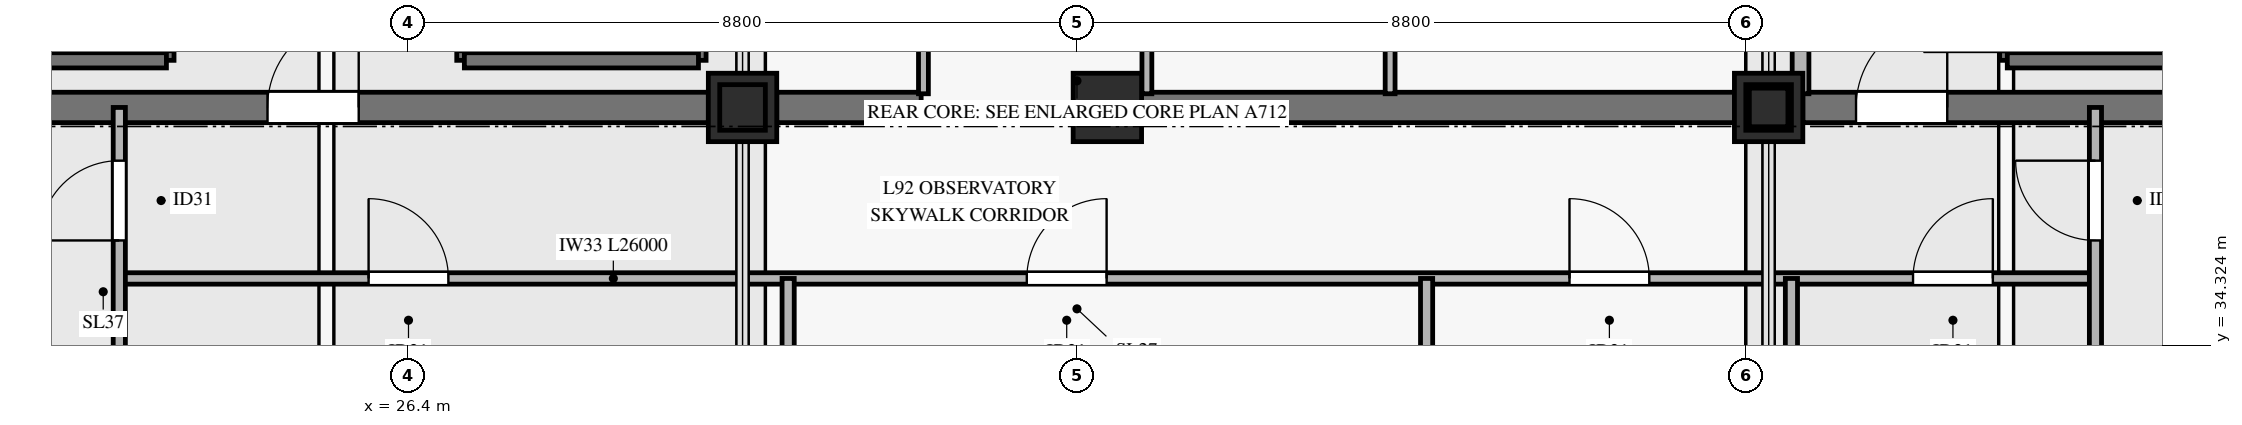
"""IFC4 building model, lengths in metres.
Left out: names, types, materials, properties, quantities, classifications, styles, units other than length and angle.
Written with IfcOpenShell. Run it as: python <this file> out.ifc"""

import sys

from ifc_helpers import new_model, si_unit, direction, frame, frame_2d, origin, origin_2d, place, context, subcontext, project, spatial, rectangle, hollow_rectangle, hollow_circle, extrude, source, transform, mapped, element, fill, save


model = new_model("IFC4")
c1 = context("Model", 3, precision=1e-05, world=origin(), true_north=direction((0.0, 1.0)))
c2 = subcontext(c1, "Body", "Model", "MODEL_VIEW")
j1 = project(units=[si_unit("LENGTHUNIT", "METRE"), si_unit("PLANEANGLEUNIT", "RADIAN")], contexts=[c1])
p1 = place(None, origin())
s1 = spatial("IfcSite", under=j1, at=p1, CompositionType="ELEMENT")
p2 = place(p1, origin())
s2 = spatial("IfcBuilding", under=s1, at=p2, CompositionType="ELEMENT")
p3 = place(p2, frame((0.0, 0.0, 352.7)))
s3 = spatial("IfcBuildingStorey", under=s2, at=p3, CompositionType="ELEMENT", Elevation=352.7)
m1 = source(origin(), c2, "Body", "SweptSolid", [
    extrude(rectangle(XDim=0.9, YDim=0.9, at=origin_2d()), origin(), (0.0, 0.0, 1.0), 6.16),
])
for number, where, z_axis, x_axis in (
    (1, (30.8, 37.45, 0.0), (0.0, 0.0, 1.0), (1.0, 0.0, 0.0)),
    (2, (35.6, 37.45, 0.0), (0.0, 0.0, 1.0), (1.0, 0.0, 0.0)),
    (3, (44.3, 37.45, 0.0), (0.0, 0.0, 1.0), (1.0, 0.0, 0.0)),
):
    element("IfcColumn", number, at=place(p3, frame(where, z_axis=z_axis, x_axis=x_axis)), inside=s3, PredefinedType="PILASTER", context=c2, shape_type="MappedRepresentation", body=[
        mapped(m1, transform((0.0, 0.0, 0.0), x_axis=(1.0, 0.0, 0.0), y_axis=(0.0, 1.0, 0.0), z_axis=(0.0, 0.0, 1.0), scale=1.0)),
    ])
p4 = place(p3, frame((20.3, 37.45, 0.0), z_axis=(0.0, 0.0, 1.0), x_axis=(1.0, 0.0, 0.0)))
e4 = element("IfcWall", 4, at=p4, inside=s3, PredefinedType="SHEAR", context=c2, shape_type="SweptSolid", body=[
    extrude(rectangle(XDim=10.05, YDim=0.4, at=frame_2d((5.025, 0.0))), origin(), (0.0, 0.0, 1.0), 6.16),
])
p5 = place(p4, frame((4.25, 0.0, 0.0)))
e5 = element("IfcOpeningElement", 5, at=p5, cuts=e4, PredefinedType="OPENING", context=c2, shape_type="SweptSolid", body=[
    extrude(rectangle(XDim=1.2, YDim=2.15, at=frame_2d((0.6, 1.075))), frame((0.0, 0.21, 0.0), z_axis=(0.0, -1.0, 0.0), x_axis=(1.0, 0.0, 0.0)), (0.0, 0.0, 1.0), 0.42),
])
p6 = place(p3, frame((31.25, 37.45, 0.0), z_axis=(0.0, 0.0, 1.0), x_axis=(1.0, 0.0, 0.0)))
e6 = element("IfcWall", 6, at=p6, inside=s3, PredefinedType="SHEAR", context=c2, shape_type="SweptSolid", body=[
    extrude(rectangle(XDim=1.9, YDim=0.4, at=frame_2d((0.95, 0.0))), origin(), (0.0, 0.0, 1.0), 6.16),
])
p7 = place(p3, frame((36.05, 37.45, 0.0), z_axis=(0.0, 0.0, 1.0), x_axis=(1.0, 0.0, 0.0)))
e7 = element("IfcWall", 7, at=p7, inside=s3, PredefinedType="SHEAR", context=c2, shape_type="SweptSolid", body=[
    extrude(rectangle(XDim=7.8, YDim=0.4, at=frame_2d((3.9, 0.0))), origin(), (0.0, 0.0, 1.0), 6.16),
])
p8 = place(p3, frame((44.75, 37.45, 0.0), z_axis=(0.0, 0.0, 1.0), x_axis=(1.0, 0.0, 0.0)))
e8 = element("IfcWall", 8, at=p8, inside=s3, PredefinedType="SHEAR", context=c2, shape_type="SweptSolid", body=[
    extrude(rectangle(XDim=5.35, YDim=0.4, at=frame_2d((2.675, 0.0))), origin(), (0.0, 0.0, 1.0), 6.16),
])
p9 = place(p8, frame((0.7, 0.0, 0.0)))
e9 = element("IfcOpeningElement", 9, at=p9, cuts=e8, PredefinedType="OPENING", context=c2, shape_type="SweptSolid", body=[
    extrude(rectangle(XDim=1.2, YDim=2.15, at=frame_2d((0.6, 1.075))), frame((0.0, 0.21, 0.0), z_axis=(0.0, -1.0, 0.0), x_axis=(1.0, 0.0, 0.0)), (0.0, 0.0, 1.0), 0.42),
])
m2 = source(origin(), c2, "Body", "SweptSolid", [
    extrude(hollow_rectangle(XDim=0.6, YDim=0.6, WallThickness=0.028, at=origin_2d()), origin(), (0.0, 0.0, 1.0), 21.147),
])
p10 = place(p3, frame((30.8, 37.45, 6.4), z_axis=(0.0, 0.0, 1.0), x_axis=(1.0, 0.0, 0.0)))
e10 = element("IfcColumn", 10, at=p10, inside=s3, PredefinedType="COLUMN", context=c2, shape_type="MappedRepresentation", body=[
    mapped(m2, transform((0.0, 0.0, 0.0), x_axis=(1.0, 0.0, 0.0), y_axis=(0.0, 1.0, 0.0), z_axis=(0.0, 0.0, 1.0), scale=1.0)),
])
m3 = source(origin(), c2, "Body", "SweptSolid", [
    extrude(hollow_rectangle(XDim=0.6, YDim=0.6, WallThickness=0.028, at=origin_2d()), origin(), (0.0, 0.0, 1.0), 32.096),
])
p11 = place(p3, frame((44.3, 37.45, 6.4), z_axis=(0.0, 0.0, 1.0), x_axis=(1.0, 0.0, 0.0)))
e11 = element("IfcColumn", 11, at=p11, inside=s3, PredefinedType="COLUMN", context=c2, shape_type="MappedRepresentation", body=[
    mapped(m3, transform((0.0, 0.0, 0.0), x_axis=(1.0, 0.0, 0.0), y_axis=(0.0, 1.0, 0.0), z_axis=(0.0, 0.0, 1.0), scale=1.0)),
])
m4 = source(origin(), c2, "Body", "SweptSolid", [
    extrude(hollow_circle(Radius=0.254, WallThickness=0.024, at=origin_2d()), origin(), (0.0, 0.0, 1.0), 1.704),
])
p12 = place(p3, frame((44.3, 37.45, 38.496), z_axis=(0.0, 0.0, 1.0), x_axis=(1.0, 0.0, 0.0)))
e12 = element("IfcColumn", 12, at=p12, inside=s3, PredefinedType="COLUMN", context=c2, shape_type="MappedRepresentation", body=[
    mapped(m4, transform((0.0, 0.0, 0.0), x_axis=(1.0, 0.0, 0.0), y_axis=(0.0, 1.0, 0.0), z_axis=(0.0, 0.0, 1.0), scale=1.0)),
])
p13 = place(p3, frame((23.22, 38.07, 0.0), z_axis=(0.0, 0.0, 1.0), x_axis=(0.0, 1.0, 0.0)))
e13 = element("IfcWall", 13, at=p13, inside=s3, PredefinedType="SOLIDWALL", context=c2, shape_type="SweptSolid", body=[
    extrude(rectangle(XDim=7.25, YDim=0.2, at=frame_2d((3.625, 0.0))), origin(), (0.0, 0.0, 1.0), 6.4),
])
p14 = place(p13, frame((0.11, 0.0, 0.0)))
e14 = element("IfcOpeningElement", 14, at=p14, cuts=e13, PredefinedType="OPENING", context=c2, shape_type="SweptSolid", body=[
    extrude(rectangle(XDim=1.1, YDim=2.15, at=frame_2d((0.55, 1.075))), frame((0.0, 0.11, 0.0), z_axis=(0.0, -1.0, 0.0), x_axis=(1.0, 0.0, 0.0)), (0.0, 0.0, 1.0), 0.22),
])
p15 = place(p3, frame((20.17, 38.07, 0.0), z_axis=(0.0, 0.0, 1.0), x_axis=(1.0, 0.0, 0.0)))
e15 = element("IfcWall", 15, at=p15, inside=s3, PredefinedType="SOLIDWALL", context=c2, shape_type="SweptSolid", body=[
    extrude(rectangle(XDim=3.05, YDim=0.2, at=frame_2d((1.525, 0.0))), origin(), (0.0, 0.0, 1.0), 6.4),
])
p16 = place(p3, frame((27.14, 38.07, 0.0), z_axis=(0.0, 0.0, 1.0), x_axis=(0.0, 1.0, 0.0)))
e16 = element("IfcWall", 16, at=p16, inside=s3, PredefinedType="SOLIDWALL", context=c2, shape_type="SweptSolid", body=[
    extrude(rectangle(XDim=7.25, YDim=0.2, at=frame_2d((3.625, 0.0))), origin(), (0.0, 0.0, 1.0), 6.4),
])
p17 = place(p16, frame((0.11, 0.0, 0.0)))
e17 = element("IfcOpeningElement", 17, at=p17, cuts=e16, PredefinedType="OPENING", context=c2, shape_type="SweptSolid", body=[
    extrude(rectangle(XDim=1.1, YDim=2.15, at=frame_2d((0.55, 1.075))), frame((0.0, 0.11, 0.0), z_axis=(0.0, -1.0, 0.0), x_axis=(1.0, 0.0, 0.0)), (0.0, 0.0, 1.0), 0.22),
])
p18 = place(p3, frame((30.22, 38.07, 0.0), z_axis=(0.0, 0.0, 1.0), x_axis=(0.0, 1.0, 0.0)))
e18 = element("IfcWall", 18, at=p18, inside=s3, PredefinedType="SOLIDWALL", context=c2, shape_type="SweptSolid", body=[
    extrude(rectangle(XDim=7.25, YDim=0.2, at=frame_2d((3.625, 0.0))), origin(), (0.0, 0.0, 1.0), 6.4),
])
p19 = place(p3, frame((27.14, 38.07, 0.0), z_axis=(0.0, 0.0, 1.0), x_axis=(1.0, 0.0, 0.0)))
e19 = element("IfcWall", 19, at=p19, inside=s3, PredefinedType="SOLIDWALL", context=c2, shape_type="SweptSolid", body=[
    extrude(rectangle(XDim=3.08, YDim=0.2, at=frame_2d((1.54, 0.0))), origin(), (0.0, 0.0, 1.0), 6.4),
])
p20 = place(p3, frame((47.44, 38.07, 0.0), z_axis=(0.0, 0.0, 1.0), x_axis=(0.0, 1.0, 0.0)))
e20 = element("IfcWall", 20, at=p20, inside=s3, PredefinedType="SOLIDWALL", context=c2, shape_type="SweptSolid", body=[
    extrude(rectangle(XDim=7.25, YDim=0.2, at=frame_2d((3.625, 0.0))), origin(), (0.0, 0.0, 1.0), 6.4),
])
p21 = place(p20, frame((0.11, 0.0, 0.0)))
e21 = element("IfcOpeningElement", 21, at=p21, cuts=e20, PredefinedType="OPENING", context=c2, shape_type="SweptSolid", body=[
    extrude(rectangle(XDim=1.1, YDim=2.15, at=frame_2d((0.55, 1.075))), frame((0.0, 0.11, 0.0), z_axis=(0.0, -1.0, 0.0), x_axis=(1.0, 0.0, 0.0)), (0.0, 0.0, 1.0), 0.22),
])
p22 = place(p3, frame((47.44, 38.07, 0.0), z_axis=(0.0, 0.0, 1.0), x_axis=(1.0, 0.0, 0.0)))
e22 = element("IfcWall", 22, at=p22, inside=s3, PredefinedType="SOLIDWALL", context=c2, shape_type="SweptSolid", body=[
    extrude(rectangle(XDim=2.93, YDim=0.2, at=frame_2d((1.465, 0.0))), origin(), (0.0, 0.0, 1.0), 6.4),
])
p23 = place(p3, frame((44.72, 37.63, 0.0), z_axis=(0.0, 0.0, 1.0), x_axis=(0.0, 1.0, 0.0)))
e23 = element("IfcWall", 23, at=p23, inside=s3, PredefinedType="SOLIDWALL", context=c2, shape_type="SweptSolid", body=[
    extrude(rectangle(XDim=7.59, YDim=0.22, at=frame_2d((3.795, 0.0))), origin(), (0.0, 0.0, 1.0), 6.16),
])
p24 = place(p3, frame((36.12, 37.63, 0.0), z_axis=(0.0, 0.0, 1.0), x_axis=(0.0, 1.0, 0.0)))
e24 = element("IfcWall", 24, at=p24, inside=s3, PredefinedType="PARTITIONING", context=c2, shape_type="SweptSolid", body=[
    extrude(rectangle(XDim=2.29, YDim=0.13, at=frame_2d((1.145, 0.0))), origin(), (0.0, 0.0, 1.0), 6.16),
])
p25 = place(p24, frame((0.69, 0.0, 0.0)))
e25 = element("IfcOpeningElement", 25, at=p25, cuts=e24, PredefinedType="OPENING", context=c2, shape_type="SweptSolid", body=[
    extrude(rectangle(XDim=0.9, YDim=2.1, at=frame_2d((0.45, 1.05))), frame((0.0, 0.075, 0.0), z_axis=(0.0, -1.0, 0.0), x_axis=(1.0, 0.0, 0.0)), (0.0, 0.0, 1.0), 0.15),
])
p26 = place(p3, frame((33.18, 37.63, 0.0), z_axis=(0.0, 0.0, 1.0), x_axis=(0.0, 1.0, 0.0)))
e26 = element("IfcWall", 26, at=p26, inside=s3, PredefinedType="PARTITIONING", context=c2, shape_type="SweptSolid", body=[
    extrude(rectangle(XDim=6.52, YDim=0.13, at=frame_2d((3.26, 0.0))), origin(), (0.0, 0.0, 1.0), 5.245),
])
p27 = place(p26, frame((2.27, 0.0, 0.0)))
e27 = element("IfcOpeningElement", 27, at=p27, cuts=e26, PredefinedType="OPENING", context=c2, shape_type="SweptSolid", body=[
    extrude(rectangle(XDim=0.9, YDim=2.1, at=frame_2d((0.45, 1.05))), frame((0.0, 0.075, 0.0), z_axis=(0.0, -1.0, 0.0), x_axis=(1.0, 0.0, 0.0)), (0.0, 0.0, 1.0), 0.15),
])
p28 = place(p3, frame((39.32, 37.63, 0.0), z_axis=(0.0, 0.0, 1.0), x_axis=(0.0, 1.0, 0.0)))
e28 = element("IfcWall", 28, at=p28, inside=s3, PredefinedType="PARTITIONING", context=c2, shape_type="SweptSolid", body=[
    extrude(rectangle(XDim=8.74, YDim=0.13, at=frame_2d((4.37, 0.0))), origin(), (0.0, 0.0, 1.0), 6.16),
])
p29 = place(p28, frame((4.89, 0.0, 0.0)))
e29 = element("IfcOpeningElement", 29, at=p29, cuts=e28, PredefinedType="OPENING", context=c2, shape_type="SweptSolid", body=[
    extrude(rectangle(XDim=0.9, YDim=2.1, at=frame_2d((0.45, 1.05))), frame((0.0, 0.075, 0.0), z_axis=(0.0, -1.0, 0.0), x_axis=(1.0, 0.0, 0.0)), (0.0, 0.0, 1.0), 0.15),
])
p30 = place(p3, frame((22.6, 35.2, 0.0), z_axis=(0.0, 0.0, 1.0), x_axis=(1.0, 0.0, 0.0)))
e30 = element("IfcWall", 30, at=p30, inside=s3, PredefinedType="PARTITIONING", context=c2, shape_type="SweptSolid", body=[
    extrude(rectangle(XDim=26.0, YDim=0.15, at=frame_2d((13.0, 0.0))), origin(), (0.0, 0.0, 1.0), 3.535),
])
p31 = place(p30, frame((3.28, 0.0, 0.0)))
e31 = element("IfcOpeningElement", 31, at=p31, cuts=e30, PredefinedType="OPENING", context=c2, shape_type="SweptSolid", body=[
    extrude(rectangle(XDim=1.05, YDim=2.15, at=frame_2d((0.525, 1.075))), frame((0.0, 0.085, 0.0), z_axis=(0.0, -1.0, 0.0), x_axis=(1.0, 0.0, 0.0)), (0.0, 0.0, 1.0), 0.17),
])
p32 = place(p30, frame((11.94, 0.0, 0.0)))
e32 = element("IfcOpeningElement", 32, at=p32, cuts=e30, PredefinedType="OPENING", context=c2, shape_type="SweptSolid", body=[
    extrude(rectangle(XDim=1.05, YDim=2.15, at=frame_2d((0.525, 1.075))), frame((0.0, 0.085, 0.0), z_axis=(0.0, -1.0, 0.0), x_axis=(1.0, 0.0, 0.0)), (0.0, 0.0, 1.0), 0.17),
])
p33 = place(p30, frame((19.08, 0.0, 0.0)))
e33 = element("IfcOpeningElement", 33, at=p33, cuts=e30, PredefinedType="OPENING", context=c2, shape_type="SweptSolid", body=[
    extrude(rectangle(XDim=1.05, YDim=2.15, at=frame_2d((0.525, 1.075))), frame((0.0, 0.085, 0.0), z_axis=(0.0, -1.0, 0.0), x_axis=(1.0, 0.0, 0.0)), (0.0, 0.0, 1.0), 0.17),
])
p34 = place(p30, frame((23.6, 0.0, 0.0)))
e34 = element("IfcOpeningElement", 34, at=p34, cuts=e30, PredefinedType="OPENING", context=c2, shape_type="SweptSolid", body=[
    extrude(rectangle(XDim=1.05, YDim=2.15, at=frame_2d((0.525, 1.075))), frame((0.0, 0.085, 0.0), z_axis=(0.0, -1.0, 0.0), x_axis=(1.0, 0.0, 0.0)), (0.0, 0.0, 1.0), 0.17),
])
p35 = place(p3, frame((22.6, 23.5, 0.0), z_axis=(0.0, 0.0, 1.0), x_axis=(0.0, 1.0, 0.0)))
e35 = element("IfcWall", 35, at=p35, inside=s3, PredefinedType="PARTITIONING", context=c2, shape_type="SweptSolid", body=[
    extrude(rectangle(XDim=13.95, YDim=0.16, at=frame_2d((6.975, 0.0))), origin(), (0.0, 0.0, 1.0), 5.745),
])
p36 = place(p35, frame((12.2, 0.0, 0.0)))
e36 = element("IfcOpeningElement", 36, at=p36, cuts=e35, PredefinedType="OPENING", context=c2, shape_type="SweptSolid", body=[
    extrude(rectangle(XDim=1.05, YDim=2.15, at=frame_2d((0.525, 1.075))), frame((0.0, 0.09, 0.0), z_axis=(0.0, -1.0, 0.0), x_axis=(1.0, 0.0, 0.0)), (0.0, 0.0, 1.0), 0.18),
])
p37 = place(p3, frame((48.6, 23.5, 0.0), z_axis=(0.0, 0.0, 1.0), x_axis=(0.0, 1.0, 0.0)))
e37 = element("IfcWall", 37, at=p37, inside=s3, PredefinedType="PARTITIONING", context=c2, shape_type="SweptSolid", body=[
    extrude(rectangle(XDim=13.95, YDim=0.16, at=frame_2d((6.975, 0.0))), origin(), (0.0, 0.0, 1.0), 5.745),
])
p38 = place(p37, frame((12.2, 0.0, 0.0)))
e38 = element("IfcOpeningElement", 38, at=p38, cuts=e37, PredefinedType="OPENING", context=c2, shape_type="SweptSolid", body=[
    extrude(rectangle(XDim=1.05, YDim=2.15, at=frame_2d((0.525, 1.075))), frame((0.0, 0.09, 0.0), z_axis=(0.0, -1.0, 0.0), x_axis=(1.0, 0.0, 0.0)), (0.0, 0.0, 1.0), 0.18),
])
for number, where, z_axis, x_axis in (
    (39, (31.4, 23.5, 0.0), (0.0, 0.0, 1.0), (0.0, 1.0, 0.0)),
    (40, (39.8, 23.5, 0.0), (0.0, 0.0, 1.0), (0.0, 1.0, 0.0)),
    (41, (44.6, 23.5, 0.0), (0.0, 0.0, 1.0), (0.0, 1.0, 0.0)),
):
    element("IfcWall", number, at=place(p3, frame(where, z_axis=z_axis, x_axis=x_axis)), inside=s3, PredefinedType="PARTITIONING", context=c2, shape_type="SweptSolid", body=[
        extrude(rectangle(XDim=11.7, YDim=0.16, at=frame_2d((5.85, 0.0))), origin(), (0.0, 0.0, 1.0), 3.535),
    ])
m5 = source(origin(), c2, "Body", "SweptSolid", [
    extrude(rectangle(XDim=1.2, YDim=2.15, at=frame_2d((0.6, 1.075))), frame((0.0, 0.025, 0.0), z_axis=(0.0, -1.0, 0.0), x_axis=(1.0, 0.0, 0.0)), (0.0, 0.0, 1.0), 0.05),
])
p39 = place(p5, origin())
e42 = element("IfcDoor", 42, at=p39, inside=s3, OperationType="SINGLE_SWING_RIGHT", PredefinedType="DOOR", context=c2, shape_type="MappedRepresentation", body=[
    mapped(m5, transform((0.0, 0.0, 0.0), x_axis=(1.0, 0.0, 0.0), y_axis=(0.0, 1.0, 0.0), z_axis=(0.0, 0.0, 1.0), scale=1.0)),
])
fill(e5, e42)
p40 = place(p9, origin())
e43 = element("IfcDoor", 43, at=p40, inside=s3, OperationType="SINGLE_SWING_RIGHT", PredefinedType="DOOR", context=c2, shape_type="MappedRepresentation", body=[
    mapped(m5, transform((0.0, 0.0, 0.0), x_axis=(1.0, 0.0, 0.0), y_axis=(0.0, 1.0, 0.0), z_axis=(0.0, 0.0, 1.0), scale=1.0)),
])
fill(e9, e43)
m6 = source(origin(), c2, "Body", "SweptSolid", [
    extrude(rectangle(XDim=1.05, YDim=2.15, at=frame_2d((0.525, 1.075))), frame((0.0, 0.025, 0.0), z_axis=(0.0, -1.0, 0.0), x_axis=(1.0, 0.0, 0.0)), (0.0, 0.0, 1.0), 0.05),
])
p41 = place(p36, origin())
e44 = element("IfcDoor", 44, at=p41, inside=s3, OperationType="SINGLE_SWING_LEFT", PredefinedType="DOOR", context=c2, shape_type="MappedRepresentation", body=[
    mapped(m6, transform((0.0, 0.0, 0.0), x_axis=(1.0, 0.0, 0.0), y_axis=(0.0, 1.0, 0.0), z_axis=(0.0, 0.0, 1.0), scale=1.0)),
])
fill(e36, e44)
p42 = place(p38, origin())
e45 = element("IfcDoor", 45, at=p42, inside=s3, OperationType="SINGLE_SWING_RIGHT", PredefinedType="DOOR", context=c2, shape_type="MappedRepresentation", body=[
    mapped(m6, transform((0.0, 0.0, 0.0), x_axis=(1.0, 0.0, 0.0), y_axis=(0.0, 1.0, 0.0), z_axis=(0.0, 0.0, 1.0), scale=1.0)),
])
fill(e38, e45)
p43 = place(p31, origin())
e46 = element("IfcDoor", 46, at=p43, inside=s3, OperationType="SINGLE_SWING_LEFT", PredefinedType="DOOR", context=c2, shape_type="MappedRepresentation", body=[
    mapped(m6, transform((0.0, 0.0, 0.0), x_axis=(1.0, 0.0, 0.0), y_axis=(0.0, 1.0, 0.0), z_axis=(0.0, 0.0, 1.0), scale=1.0)),
])
fill(e31, e46)
p44 = place(p32, origin())
e47 = element("IfcDoor", 47, at=p44, inside=s3, OperationType="SINGLE_SWING_RIGHT", PredefinedType="DOOR", context=c2, shape_type="MappedRepresentation", body=[
    mapped(m6, transform((0.0, 0.0, 0.0), x_axis=(1.0, 0.0, 0.0), y_axis=(0.0, 1.0, 0.0), z_axis=(0.0, 0.0, 1.0), scale=1.0)),
])
fill(e32, e47)
p45 = place(p33, origin())
e48 = element("IfcDoor", 48, at=p45, inside=s3, OperationType="SINGLE_SWING_LEFT", PredefinedType="DOOR", context=c2, shape_type="MappedRepresentation", body=[
    mapped(m6, transform((0.0, 0.0, 0.0), x_axis=(1.0, 0.0, 0.0), y_axis=(0.0, 1.0, 0.0), z_axis=(0.0, 0.0, 1.0), scale=1.0)),
])
fill(e33, e48)
p46 = place(p34, origin())
e49 = element("IfcDoor", 49, at=p46, inside=s3, OperationType="SINGLE_SWING_RIGHT", PredefinedType="DOOR", context=c2, shape_type="MappedRepresentation", body=[
    mapped(m6, transform((0.0, 0.0, 0.0), x_axis=(1.0, 0.0, 0.0), y_axis=(0.0, 1.0, 0.0), z_axis=(0.0, 0.0, 1.0), scale=1.0)),
])
fill(e34, e49)
save(model, sys.argv[1])
